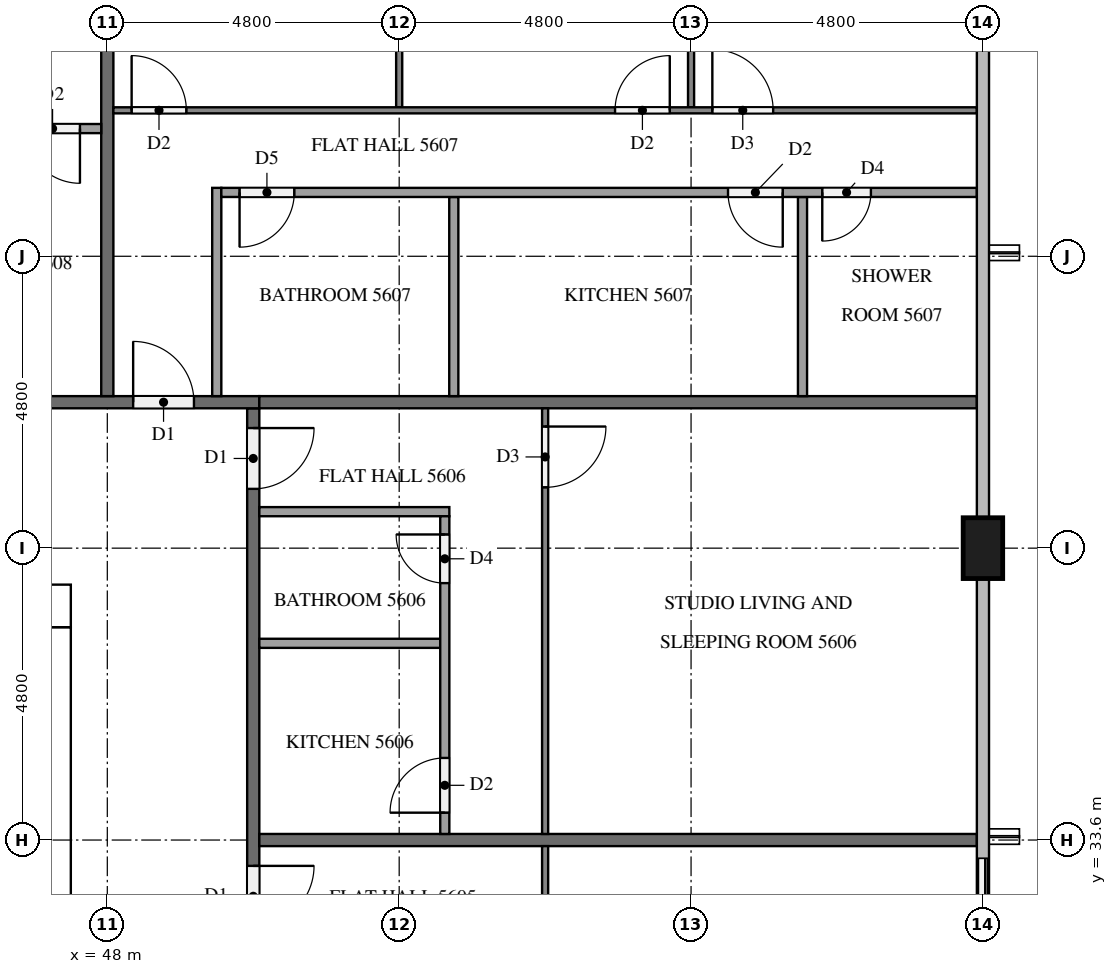
"""IFC4 building model, lengths in metres.
Left out: names, types, materials, properties, quantities, classifications, styles, units other than length and angle.
Written with IfcOpenShell. Run it as: python <this file> out.ifc"""

import sys

from ifc_helpers import new_model, si_unit, direction, frame, frame_2d, origin, origin_2d, place, context, subcontext, project, spatial, rectangle, extrude, element, fill, save


model = new_model("IFC4")
c1 = context("Model", 3, precision=1e-05, world=origin(), true_north=direction((0.0, 1.0)))
c2 = subcontext(c1, "Body", "Model", "MODEL_VIEW")
j1 = project(units=[si_unit("LENGTHUNIT", "METRE"), si_unit("PLANEANGLEUNIT", "RADIAN")], contexts=[c1])
p1 = place(None, origin())
s1 = spatial("IfcSite", under=j1, at=p1, CompositionType="ELEMENT")
p2 = place(p1, origin())
s2 = spatial("IfcBuilding", under=s1, at=p2, CompositionType="ELEMENT")
p3 = place(p2, frame((0.0, 0.0, 215.8)))
s3 = spatial("IfcBuildingStorey", under=s2, at=p3, CompositionType="ELEMENT", Elevation=215.8)
p4 = place(p3, frame((15.0, 37.45, 0.0), z_axis=(0.0, 0.0, 1.0), x_axis=(1.0, 0.0, 0.0)))
e1 = element("IfcWall", 1, at=p4, inside=s3, PredefinedType="SHEAR", context=c2, shape_type="SweptSolid", body=[
    extrude(rectangle(XDim=32.4, YDim=0.7, at=frame_2d((16.2, 0.0))), origin(), (0.0, 0.0, 1.0), 3.2),
])
p5 = place(p4, frame((15.3, 0.0, 0.0)))
e2 = element("IfcOpeningElement", 2, at=p5, cuts=e1, PredefinedType="OPENING", context=c2, shape_type="SweptSolid", body=[
    extrude(rectangle(XDim=1.8, YDim=2.1, at=frame_2d((0.9, 1.05))), frame((0.0, 0.36, 0.0), z_axis=(0.0, -1.0, 0.0), x_axis=(1.0, 0.0, 0.0)), (0.0, 0.0, 1.0), 0.72),
])
p6 = place(p4, frame((1.544, 0.0, 0.0)))
e3 = element("IfcOpeningElement", 3, at=p6, cuts=e1, PredefinedType="OPENING", context=c2, shape_type="SweptSolid", body=[
    extrude(rectangle(XDim=1.0, YDim=2.1, at=frame_2d((0.5, 1.05))), frame((0.0, 0.36, 0.0), z_axis=(0.0, -1.0, 0.0), x_axis=(1.0, 0.0, 0.0)), (0.0, 0.0, 1.0), 0.72),
])
p7 = place(p4, frame((5.219, 0.0, 0.0)))
e4 = element("IfcOpeningElement", 4, at=p7, cuts=e1, PredefinedType="OPENING", context=c2, shape_type="SweptSolid", body=[
    extrude(rectangle(XDim=1.0, YDim=2.1, at=frame_2d((0.5, 1.05))), frame((0.0, 0.36, 0.0), z_axis=(0.0, -1.0, 0.0), x_axis=(1.0, 0.0, 0.0)), (0.0, 0.0, 1.0), 0.72),
])
p8 = place(p3, frame((47.05, 15.7, 0.0), z_axis=(0.0, 0.0, 1.0), x_axis=(0.0, 1.0, 0.0)))
e5 = element("IfcWall", 5, at=p8, inside=s3, PredefinedType="SHEAR", context=c2, shape_type="SweptSolid", body=[
    extrude(rectangle(XDim=21.4, YDim=0.7, at=frame_2d((10.7, 0.0))), origin(), (0.0, 0.0, 1.0), 3.2),
])
p9 = place(p8, frame((10.4, 0.0, 0.0)))
e6 = element("IfcOpeningElement", 6, at=p9, cuts=e5, PredefinedType="OPENING", context=c2, shape_type="SweptSolid", body=[
    extrude(rectangle(XDim=1.2, YDim=2.1, at=frame_2d((0.6, 1.05))), frame((0.0, 0.36, 0.0), z_axis=(0.0, -1.0, 0.0), x_axis=(1.0, 0.0, 0.0)), (0.0, 0.0, 1.0), 0.72),
])
p10 = place(p3, frame((62.4, 38.4, 0.0), z_axis=(0.0, 0.0, 1.0), x_axis=(0.0, 1.0, 0.0)))
e7 = element("IfcColumn", 7, at=p10, inside=s3, PredefinedType="COLUMN", context=c2, shape_type="SweptSolid", body=[
    extrude(rectangle(XDim=1.0, YDim=0.65, at=origin_2d()), origin(), (0.0, 0.0, 1.0), 3.2),
])
p11 = place(p3, frame((62.4, 31.2, 0.0), z_axis=(0.0, 0.0, 1.0), x_axis=(0.0, 1.0, 0.0)))
e8 = element("IfcWall", 8, at=p11, inside=s3, PredefinedType="SOLIDWALL", context=c2, shape_type="SweptSolid", body=[
    extrude(rectangle(XDim=2.4, YDim=0.15, at=frame_2d((1.2, 0.0))), origin(), (0.0, 0.0, 1.0), 3.2),
])
p12 = place(p11, frame((0.3, 0.0, 0.0)))
e9 = element("IfcOpeningElement", 9, at=p12, cuts=e8, PredefinedType="OPENING", context=c2, shape_type="SweptSolid", body=[
    extrude(rectangle(XDim=1.8, YDim=2.4, at=frame_2d((0.9, 1.2))), frame((0.0, 0.085, 0.0), z_axis=(0.0, -1.0, 0.0), x_axis=(1.0, 0.0, 0.0)), (0.0, 0.0, 1.0), 0.17),
])
p13 = place(p3, frame((50.4, 40.7, 0.0), z_axis=(0.0, 0.0, 1.0), x_axis=(0.0, -1.0, 0.0)))
e10 = element("IfcWall", 10, at=p13, inside=s3, PredefinedType="PARTITIONING", context=c2, shape_type="SweptSolid", body=[
    extrude(rectangle(XDim=28.6, YDim=0.2, at=frame_2d((14.3, 0.0))), origin(), (0.0, 0.0, 1.0), 3.2),
])
p14 = place(p13, frame((19.525, 0.0, 0.0)))
e11 = element("IfcOpeningElement", 11, at=p14, cuts=e10, PredefinedType="OPENING", context=c2, shape_type="SweptSolid", body=[
    extrude(rectangle(XDim=1.0, YDim=2.1, at=frame_2d((0.5, 1.05))), frame((0.0, 0.11, 0.0), z_axis=(0.0, -1.0, 0.0), x_axis=(1.0, 0.0, 0.0)), (0.0, 0.0, 1.0), 0.22),
])
p15 = place(p13, frame((7.525, 0.0, 0.0)))
e12 = element("IfcOpeningElement", 12, at=p15, cuts=e10, PredefinedType="OPENING", context=c2, shape_type="SweptSolid", body=[
    extrude(rectangle(XDim=1.0, YDim=2.1, at=frame_2d((0.5, 1.05))), frame((0.0, 0.11, 0.0), z_axis=(0.0, -1.0, 0.0), x_axis=(1.0, 0.0, 0.0)), (0.0, 0.0, 1.0), 0.22),
])
p16 = place(p13, frame((0.325, 0.0, 0.0)))
e13 = element("IfcOpeningElement", 13, at=p16, cuts=e10, PredefinedType="OPENING", context=c2, shape_type="SweptSolid", body=[
    extrude(rectangle(XDim=1.0, YDim=2.1, at=frame_2d((0.5, 1.05))), frame((0.0, 0.11, 0.0), z_axis=(0.0, -1.0, 0.0), x_axis=(1.0, 0.0, 0.0)), (0.0, 0.0, 1.0), 0.22),
])
p17 = place(p3, frame((11.9, 40.8, 0.0), z_axis=(0.0, 0.0, 1.0), x_axis=(1.0, 0.0, 0.0)))
e14 = element("IfcWall", 14, at=p17, inside=s3, PredefinedType="PARTITIONING", context=c2, shape_type="SweptSolid", body=[
    extrude(rectangle(XDim=38.6, YDim=0.2, at=frame_2d((19.3, 0.0))), origin(), (0.0, 0.0, 1.0), 3.2),
])
p18 = place(p17, frame((36.525, 0.0, 0.0)))
e15 = element("IfcOpeningElement", 15, at=p18, cuts=e14, PredefinedType="OPENING", context=c2, shape_type="SweptSolid", body=[
    extrude(rectangle(XDim=1.0, YDim=2.1, at=frame_2d((0.5, 1.05))), frame((0.0, 0.11, 0.0), z_axis=(0.0, -1.0, 0.0), x_axis=(1.0, 0.0, 0.0)), (0.0, 0.0, 1.0), 0.22),
])
p19 = place(p17, frame((29.325, 0.0, 0.0)))
e16 = element("IfcOpeningElement", 16, at=p19, cuts=e14, PredefinedType="OPENING", context=c2, shape_type="SweptSolid", body=[
    extrude(rectangle(XDim=1.0, YDim=2.1, at=frame_2d((0.5, 1.05))), frame((0.0, 0.11, 0.0), z_axis=(0.0, -1.0, 0.0), x_axis=(1.0, 0.0, 0.0)), (0.0, 0.0, 1.0), 0.22),
])
p20 = place(p17, frame((12.525, 0.0, 0.0)))
e17 = element("IfcOpeningElement", 17, at=p20, cuts=e14, PredefinedType="OPENING", context=c2, shape_type="SweptSolid", body=[
    extrude(rectangle(XDim=1.0, YDim=2.1, at=frame_2d((0.5, 1.05))), frame((0.0, 0.11, 0.0), z_axis=(0.0, -1.0, 0.0), x_axis=(1.0, 0.0, 0.0)), (0.0, 0.0, 1.0), 0.22),
])
p21 = place(p17, frame((10.625, 0.0, 0.0)))
e18 = element("IfcOpeningElement", 18, at=p21, cuts=e14, PredefinedType="OPENING", context=c2, shape_type="SweptSolid", body=[
    extrude(rectangle(XDim=1.1, YDim=2.1, at=frame_2d((0.55, 1.05))), frame((0.0, 0.11, 0.0), z_axis=(0.0, -1.0, 0.0), x_axis=(1.0, 0.0, 0.0)), (0.0, 0.0, 1.0), 0.22),
])
for number, where, z_axis, x_axis in (
    (19, (50.5, 33.6, 0.0), (0.0, 0.0, 1.0), (1.0, 0.0, 0.0)),
    (20, (50.5, 40.8, 0.0), (0.0, 0.0, 1.0), (1.0, 0.0, 0.0)),
):
    element("IfcWall", number, at=place(p3, frame(where, z_axis=z_axis, x_axis=x_axis)), inside=s3, PredefinedType="PARTITIONING", context=c2, shape_type="SweptSolid", body=[
        extrude(rectangle(XDim=11.8, YDim=0.2, at=frame_2d((5.9, 0.0))), origin(), (0.0, 0.0, 1.0), 3.2),
    ])
p22 = place(p3, frame((48.0, 52.475, 0.0), z_axis=(0.0, 0.0, 1.0), x_axis=(0.0, -1.0, 0.0)))
e21 = element("IfcWall", 21, at=p22, inside=s3, PredefinedType="PARTITIONING", context=c2, shape_type="SweptSolid", body=[
    extrude(rectangle(XDim=11.575, YDim=0.2, at=frame_2d((5.788, 0.0))), origin(), (0.0, 0.0, 1.0), 3.2),
])
p23 = place(p3, frame((55.2, 33.5, 0.0), z_axis=(0.0, 0.0, 1.0), x_axis=(0.0, -1.0, 0.0)))
e22 = element("IfcWall", 22, at=p23, inside=s3, PredefinedType="PARTITIONING", context=c2, shape_type="SweptSolid", body=[
    extrude(rectangle(XDim=11.8, YDim=0.1, at=frame_2d((5.9, 0.0))), origin(), (0.0, 0.0, 1.0), 3.2),
])
p24 = place(p23, frame((5.75, 0.0, 0.0)))
e23 = element("IfcOpeningElement", 23, at=p24, cuts=e22, PredefinedType="OPENING", context=c2, shape_type="SweptSolid", body=[
    extrude(rectangle(XDim=1.0, YDim=2.1, at=frame_2d((0.5, 1.05))), frame((0.0, 0.06, 0.0), z_axis=(0.0, -1.0, 0.0), x_axis=(1.0, 0.0, 0.0)), (0.0, 0.0, 1.0), 0.12),
])
p25 = place(p23, frame((7.45, 0.0, 0.0)))
e24 = element("IfcOpeningElement", 24, at=p25, cuts=e22, PredefinedType="OPENING", context=c2, shape_type="SweptSolid", body=[
    extrude(rectangle(XDim=0.9, YDim=2.1, at=frame_2d((0.45, 1.05))), frame((0.0, 0.06, 0.0), z_axis=(0.0, -1.0, 0.0), x_axis=(1.0, 0.0, 0.0)), (0.0, 0.0, 1.0), 0.12),
])
p26 = place(p3, frame((55.2, 40.7, 0.0), z_axis=(0.0, 0.0, 1.0), x_axis=(0.0, -1.0, 0.0)))
e25 = element("IfcWall", 25, at=p26, inside=s3, PredefinedType="PARTITIONING", context=c2, shape_type="SweptSolid", body=[
    extrude(rectangle(XDim=7.0, YDim=0.1, at=frame_2d((3.5, 0.0))), origin(), (0.0, 0.0, 1.0), 3.2),
])
p27 = place(p26, frame((0.3, 0.0, 0.0)))
e26 = element("IfcOpeningElement", 26, at=p27, cuts=e25, PredefinedType="OPENING", context=c2, shape_type="SweptSolid", body=[
    extrude(rectangle(XDim=1.0, YDim=2.1, at=frame_2d((0.5, 1.05))), frame((0.0, 0.06, 0.0), z_axis=(0.0, -1.0, 0.0), x_axis=(1.0, 0.0, 0.0)), (0.0, 0.0, 1.0), 0.12),
])
p28 = place(p3, frame((50.5, 36.835, 0.0), z_axis=(0.0, 0.0, 1.0), x_axis=(1.0, 0.0, 0.0)))
e27 = element("IfcWall", 27, at=p28, inside=s3, PredefinedType="PARTITIONING", context=c2, shape_type="SweptSolid", body=[
    extrude(rectangle(XDim=2.975, YDim=0.15, at=frame_2d((1.488, 0.0))), origin(), (0.0, 0.0, 1.0), 3.2),
])
p29 = place(p3, frame((50.5, 39.0, 0.0), z_axis=(0.0, 0.0, 1.0), x_axis=(1.0, 0.0, 0.0)))
e28 = element("IfcWall", 28, at=p29, inside=s3, PredefinedType="PARTITIONING", context=c2, shape_type="SweptSolid", body=[
    extrude(rectangle(XDim=3.125, YDim=0.15, at=frame_2d((1.562, 0.0))), origin(), (0.0, 0.0, 1.0), 3.2),
])
p30 = place(p3, frame((53.55, 33.7, 0.0), z_axis=(0.0, 0.0, 1.0), x_axis=(0.0, 1.0, 0.0)))
e29 = element("IfcWall", 29, at=p30, inside=s3, PredefinedType="PARTITIONING", context=c2, shape_type="SweptSolid", body=[
    extrude(rectangle(XDim=5.225, YDim=0.15, at=frame_2d((2.613, 0.0))), origin(), (0.0, 0.0, 1.0), 3.2),
])
p31 = place(p30, frame((4.125, 0.0, 0.0)))
e30 = element("IfcOpeningElement", 30, at=p31, cuts=e29, PredefinedType="OPENING", context=c2, shape_type="SweptSolid", body=[
    extrude(rectangle(XDim=0.8, YDim=2.1, at=frame_2d((0.4, 1.05))), frame((0.0, 0.085, 0.0), z_axis=(0.0, -1.0, 0.0), x_axis=(1.0, 0.0, 0.0)), (0.0, 0.0, 1.0), 0.17),
])
p32 = place(p30, frame((0.35, 0.0, 0.0)))
e31 = element("IfcOpeningElement", 31, at=p32, cuts=e29, PredefinedType="OPENING", context=c2, shape_type="SweptSolid", body=[
    extrude(rectangle(XDim=0.9, YDim=2.1, at=frame_2d((0.45, 1.05))), frame((0.0, 0.085, 0.0), z_axis=(0.0, -1.0, 0.0), x_axis=(1.0, 0.0, 0.0)), (0.0, 0.0, 1.0), 0.17),
])
p33 = place(p3, frame((52.8, 45.65, 0.0), z_axis=(0.0, 0.0, 1.0), x_axis=(0.0, 1.0, 0.0)))
e32 = element("IfcWall", 32, at=p33, inside=s3, PredefinedType="PARTITIONING", context=c2, shape_type="SweptSolid", body=[
    extrude(rectangle(XDim=7.05, YDim=0.1, at=frame_2d((3.525, 0.0))), origin(), (0.0, 0.0, 1.0), 3.2),
])
p34 = place(p3, frame((57.6, 45.65, 0.0), z_axis=(0.0, 0.0, 1.0), x_axis=(0.0, 1.0, 0.0)))
e33 = element("IfcWall", 33, at=p34, inside=s3, PredefinedType="PARTITIONING", context=c2, shape_type="SweptSolid", body=[
    extrude(rectangle(XDim=6.675, YDim=0.1, at=frame_2d((3.337, 0.0))), origin(), (0.0, 0.0, 1.0), 3.2),
])
p35 = place(p3, frame((48.1, 45.6, 0.0), z_axis=(0.0, 0.0, 1.0), x_axis=(1.0, 0.0, 0.0)))
e34 = element("IfcWall", 34, at=p35, inside=s3, PredefinedType="PARTITIONING", context=c2, shape_type="SweptSolid", body=[
    extrude(rectangle(XDim=14.2, YDim=0.1, at=frame_2d((7.1, 0.0))), origin(), (0.0, 0.0, 1.0), 3.2),
])
p36 = place(p35, frame((0.3, 0.0, 0.0)))
e35 = element("IfcOpeningElement", 35, at=p36, cuts=e34, PredefinedType="OPENING", context=c2, shape_type="SweptSolid", body=[
    extrude(rectangle(XDim=0.9, YDim=2.1, at=frame_2d((0.45, 1.05))), frame((0.0, 0.06, 0.0), z_axis=(0.0, -1.0, 0.0), x_axis=(1.0, 0.0, 0.0)), (0.0, 0.0, 1.0), 0.12),
])
p37 = place(p35, frame((8.25, 0.0, 0.0)))
e36 = element("IfcOpeningElement", 36, at=p37, cuts=e34, PredefinedType="OPENING", context=c2, shape_type="SweptSolid", body=[
    extrude(rectangle(XDim=0.9, YDim=2.1, at=frame_2d((0.45, 1.05))), frame((0.0, 0.06, 0.0), z_axis=(0.0, -1.0, 0.0), x_axis=(1.0, 0.0, 0.0)), (0.0, 0.0, 1.0), 0.12),
])
p38 = place(p35, frame((9.85, 0.0, 0.0)))
e37 = element("IfcOpeningElement", 37, at=p38, cuts=e34, PredefinedType="OPENING", context=c2, shape_type="SweptSolid", body=[
    extrude(rectangle(XDim=1.0, YDim=2.1, at=frame_2d((0.5, 1.05))), frame((0.0, 0.06, 0.0), z_axis=(0.0, -1.0, 0.0), x_axis=(1.0, 0.0, 0.0)), (0.0, 0.0, 1.0), 0.12),
])
for number, where, z_axis, x_axis in (
    (38, (53.698, 40.9, 0.0), (0.0, 0.0, 1.0), (0.0, 1.0, 0.0)),
    (39, (59.433, 40.9, 0.0), (0.0, 0.0, 1.0), (0.0, 1.0, 0.0)),
):
    element("IfcWall", number, at=place(p3, frame(where, z_axis=z_axis, x_axis=x_axis)), inside=s3, PredefinedType="PARTITIONING", context=c2, shape_type="SweptSolid", body=[
        extrude(rectangle(XDim=3.275, YDim=0.15, at=frame_2d((1.638, 0.0))), origin(), (0.0, 0.0, 1.0), 3.2),
    ])
p39 = place(p3, frame((49.8, 40.9, 0.0), z_axis=(0.0, 0.0, 1.0), x_axis=(0.0, 1.0, 0.0)))
e40 = element("IfcWall", 40, at=p39, inside=s3, PredefinedType="PARTITIONING", context=c2, shape_type="SweptSolid", body=[
    extrude(rectangle(XDim=3.425, YDim=0.15, at=frame_2d((1.712, 0.0))), origin(), (0.0, 0.0, 1.0), 3.2),
])
p40 = place(p3, frame((62.3, 44.25, 0.0), z_axis=(0.0, 0.0, 1.0), x_axis=(-1.0, 0.0, 0.0)))
e41 = element("IfcWall", 41, at=p40, inside=s3, PredefinedType="PARTITIONING", context=c2, shape_type="SweptSolid", body=[
    extrude(rectangle(XDim=12.425, YDim=0.15, at=frame_2d((6.212, 0.0))), origin(), (0.0, 0.0, 1.0), 3.2),
])
p41 = place(p40, frame((11.225, 0.0, 0.0)))
e42 = element("IfcOpeningElement", 42, at=p41, cuts=e41, PredefinedType="OPENING", context=c2, shape_type="SweptSolid", body=[
    extrude(rectangle(XDim=0.9, YDim=2.1, at=frame_2d((0.45, 1.05))), frame((0.0, 0.085, 0.0), z_axis=(0.0, -1.0, 0.0), x_axis=(1.0, 0.0, 0.0)), (0.0, 0.0, 1.0), 0.17),
])
p42 = place(p40, frame((3.192, 0.0, 0.0)))
e43 = element("IfcOpeningElement", 43, at=p42, cuts=e41, PredefinedType="OPENING", context=c2, shape_type="SweptSolid", body=[
    extrude(rectangle(XDim=0.9, YDim=2.1, at=frame_2d((0.45, 1.05))), frame((0.0, 0.085, 0.0), z_axis=(0.0, -1.0, 0.0), x_axis=(1.0, 0.0, 0.0)), (0.0, 0.0, 1.0), 0.17),
])
p43 = place(p40, frame((1.742, 0.0, 0.0)))
e44 = element("IfcOpeningElement", 44, at=p43, cuts=e41, PredefinedType="OPENING", context=c2, shape_type="SweptSolid", body=[
    extrude(rectangle(XDim=0.8, YDim=2.1, at=frame_2d((0.4, 1.05))), frame((0.0, 0.085, 0.0), z_axis=(0.0, -1.0, 0.0), x_axis=(1.0, 0.0, 0.0)), (0.0, 0.0, 1.0), 0.17),
])
p44 = place(p3, frame((47.9, 45.3, 0.0), z_axis=(0.0, 0.0, 1.0), x_axis=(-1.0, 0.0, 0.0)))
e45 = element("IfcWall", 45, at=p44, inside=s3, PredefinedType="PARTITIONING", context=c2, shape_type="SweptSolid", body=[
    extrude(rectangle(XDim=5.225, YDim=0.15, at=frame_2d((2.612, 0.0))), origin(), (0.0, 0.0, 1.0), 3.2),
])
p45 = place(p44, frame((4.125, 0.0, 0.0)))
e46 = element("IfcOpeningElement", 46, at=p45, cuts=e45, PredefinedType="OPENING", context=c2, shape_type="SweptSolid", body=[
    extrude(rectangle(XDim=0.8, YDim=2.1, at=frame_2d((0.4, 1.05))), frame((0.0, 0.085, 0.0), z_axis=(0.0, -1.0, 0.0), x_axis=(1.0, 0.0, 0.0)), (0.0, 0.0, 1.0), 0.17),
])
p46 = place(p44, frame((0.35, 0.0, 0.0)))
e47 = element("IfcOpeningElement", 47, at=p46, cuts=e45, PredefinedType="OPENING", context=c2, shape_type="SweptSolid", body=[
    extrude(rectangle(XDim=0.9, YDim=2.1, at=frame_2d((0.45, 1.05))), frame((0.0, 0.085, 0.0), z_axis=(0.0, -1.0, 0.0), x_axis=(1.0, 0.0, 0.0)), (0.0, 0.0, 1.0), 0.17),
])
p47 = place(p12, origin())
e48 = element("IfcDoor", 48, at=p47, inside=s3, OperationType="SLIDING_TO_RIGHT", PredefinedType="DOOR", context=c2, shape_type="SweptSolid", body=[
    extrude(rectangle(XDim=1.8, YDim=2.4, at=frame_2d((0.9, 1.2))), frame((0.0, 0.025, 0.0), z_axis=(0.0, -1.0, 0.0), x_axis=(1.0, 0.0, 0.0)), (0.0, 0.0, 1.0), 0.05),
])
fill(e9, e48)
p48 = place(p15, origin())
e49 = element("IfcDoor", 49, at=p48, inside=s3, OperationType="SINGLE_SWING_LEFT", PredefinedType="DOOR", context=c2, shape_type="SweptSolid", body=[
    extrude(rectangle(XDim=1.0, YDim=2.1, at=frame_2d((0.5, 1.05))), frame((0.0, 0.025, 0.0), z_axis=(0.0, -1.0, 0.0), x_axis=(1.0, 0.0, 0.0)), (0.0, 0.0, 1.0), 0.05),
])
fill(e12, e49)
p49 = place(p16, origin())
e50 = element("IfcDoor", 50, at=p49, inside=s3, OperationType="SINGLE_SWING_LEFT", PredefinedType="DOOR", context=c2, shape_type="SweptSolid", body=[
    extrude(rectangle(XDim=1.0, YDim=2.1, at=frame_2d((0.5, 1.05))), frame((0.0, 0.025, 0.0), z_axis=(0.0, -1.0, 0.0), x_axis=(1.0, 0.0, 0.0)), (0.0, 0.0, 1.0), 0.05),
])
fill(e13, e50)
p50 = place(p18, origin())
e51 = element("IfcDoor", 51, at=p50, inside=s3, OperationType="SINGLE_SWING_LEFT", PredefinedType="DOOR", context=c2, shape_type="SweptSolid", body=[
    extrude(rectangle(XDim=1.0, YDim=2.1, at=frame_2d((0.5, 1.05))), frame((0.0, 0.025, 0.0), z_axis=(0.0, -1.0, 0.0), x_axis=(1.0, 0.0, 0.0)), (0.0, 0.0, 1.0), 0.05),
])
fill(e15, e51)
p51 = place(p27, origin())
e52 = element("IfcDoor", 52, at=p51, inside=s3, OperationType="SINGLE_SWING_LEFT", PredefinedType="DOOR", context=c2, shape_type="SweptSolid", body=[
    extrude(rectangle(XDim=1.0, YDim=2.1, at=frame_2d((0.5, 1.05))), frame((0.0, 0.025, 0.0), z_axis=(0.0, -1.0, 0.0), x_axis=(1.0, 0.0, 0.0)), (0.0, 0.0, 1.0), 0.05),
])
fill(e26, e52)
p52 = place(p31, origin())
e53 = element("IfcDoor", 53, at=p52, inside=s3, OperationType="SINGLE_SWING_RIGHT", PredefinedType="DOOR", context=c2, shape_type="SweptSolid", body=[
    extrude(rectangle(XDim=0.8, YDim=2.1, at=frame_2d((0.4, 1.05))), frame((0.0, 0.025, 0.0), z_axis=(0.0, -1.0, 0.0), x_axis=(1.0, 0.0, 0.0)), (0.0, 0.0, 1.0), 0.05),
])
fill(e30, e53)
p53 = place(p32, origin())
e54 = element("IfcDoor", 54, at=p53, inside=s3, OperationType="SINGLE_SWING_LEFT", PredefinedType="DOOR", context=c2, shape_type="SweptSolid", body=[
    extrude(rectangle(XDim=0.9, YDim=2.1, at=frame_2d((0.45, 1.05))), frame((0.0, 0.025, 0.0), z_axis=(0.0, -1.0, 0.0), x_axis=(1.0, 0.0, 0.0)), (0.0, 0.0, 1.0), 0.05),
])
fill(e31, e54)
p54 = place(p36, origin())
e55 = element("IfcDoor", 55, at=p54, inside=s3, OperationType="SINGLE_SWING_LEFT", PredefinedType="DOOR", context=c2, shape_type="SweptSolid", body=[
    extrude(rectangle(XDim=0.9, YDim=2.1, at=frame_2d((0.45, 1.05))), frame((0.0, 0.025, 0.0), z_axis=(0.0, -1.0, 0.0), x_axis=(1.0, 0.0, 0.0)), (0.0, 0.0, 1.0), 0.05),
])
fill(e35, e55)
p55 = place(p37, origin())
e56 = element("IfcDoor", 56, at=p55, inside=s3, OperationType="SINGLE_SWING_RIGHT", PredefinedType="DOOR", context=c2, shape_type="SweptSolid", body=[
    extrude(rectangle(XDim=0.9, YDim=2.1, at=frame_2d((0.45, 1.05))), frame((0.0, 0.025, 0.0), z_axis=(0.0, -1.0, 0.0), x_axis=(1.0, 0.0, 0.0)), (0.0, 0.0, 1.0), 0.05),
])
fill(e36, e56)
p56 = place(p38, origin())
e57 = element("IfcDoor", 57, at=p56, inside=s3, OperationType="SINGLE_SWING_LEFT", PredefinedType="DOOR", context=c2, shape_type="SweptSolid", body=[
    extrude(rectangle(XDim=1.0, YDim=2.1, at=frame_2d((0.5, 1.05))), frame((0.0, 0.025, 0.0), z_axis=(0.0, -1.0, 0.0), x_axis=(1.0, 0.0, 0.0)), (0.0, 0.0, 1.0), 0.05),
])
fill(e37, e57)
p57 = place(p41, origin())
e58 = element("IfcDoor", 58, at=p57, inside=s3, OperationType="SINGLE_SWING_RIGHT", PredefinedType="DOOR", context=c2, shape_type="SweptSolid", body=[
    extrude(rectangle(XDim=0.9, YDim=2.1, at=frame_2d((0.45, 1.05))), frame((0.0, 0.025, 0.0), z_axis=(0.0, -1.0, 0.0), x_axis=(1.0, 0.0, 0.0)), (0.0, 0.0, 1.0), 0.05),
])
fill(e42, e58)
p58 = place(p42, origin())
e59 = element("IfcDoor", 59, at=p58, inside=s3, OperationType="SINGLE_SWING_LEFT", PredefinedType="DOOR", context=c2, shape_type="SweptSolid", body=[
    extrude(rectangle(XDim=0.9, YDim=2.1, at=frame_2d((0.45, 1.05))), frame((0.0, 0.025, 0.0), z_axis=(0.0, -1.0, 0.0), x_axis=(1.0, 0.0, 0.0)), (0.0, 0.0, 1.0), 0.05),
])
fill(e43, e59)
p59 = place(p43, origin())
e60 = element("IfcDoor", 60, at=p59, inside=s3, OperationType="SINGLE_SWING_RIGHT", PredefinedType="DOOR", context=c2, shape_type="SweptSolid", body=[
    extrude(rectangle(XDim=0.8, YDim=2.1, at=frame_2d((0.4, 1.05))), frame((0.0, 0.025, 0.0), z_axis=(0.0, -1.0, 0.0), x_axis=(1.0, 0.0, 0.0)), (0.0, 0.0, 1.0), 0.05),
])
fill(e44, e60)
p60 = place(p46, origin())
e61 = element("IfcDoor", 61, at=p60, inside=s3, OperationType="SINGLE_SWING_LEFT", PredefinedType="DOOR", context=c2, shape_type="SweptSolid", body=[
    extrude(rectangle(XDim=0.9, YDim=2.1, at=frame_2d((0.45, 1.05))), frame((0.0, 0.025, 0.0), z_axis=(0.0, -1.0, 0.0), x_axis=(1.0, 0.0, 0.0)), (0.0, 0.0, 1.0), 0.05),
])
fill(e47, e61)
save(model, sys.argv[1])
